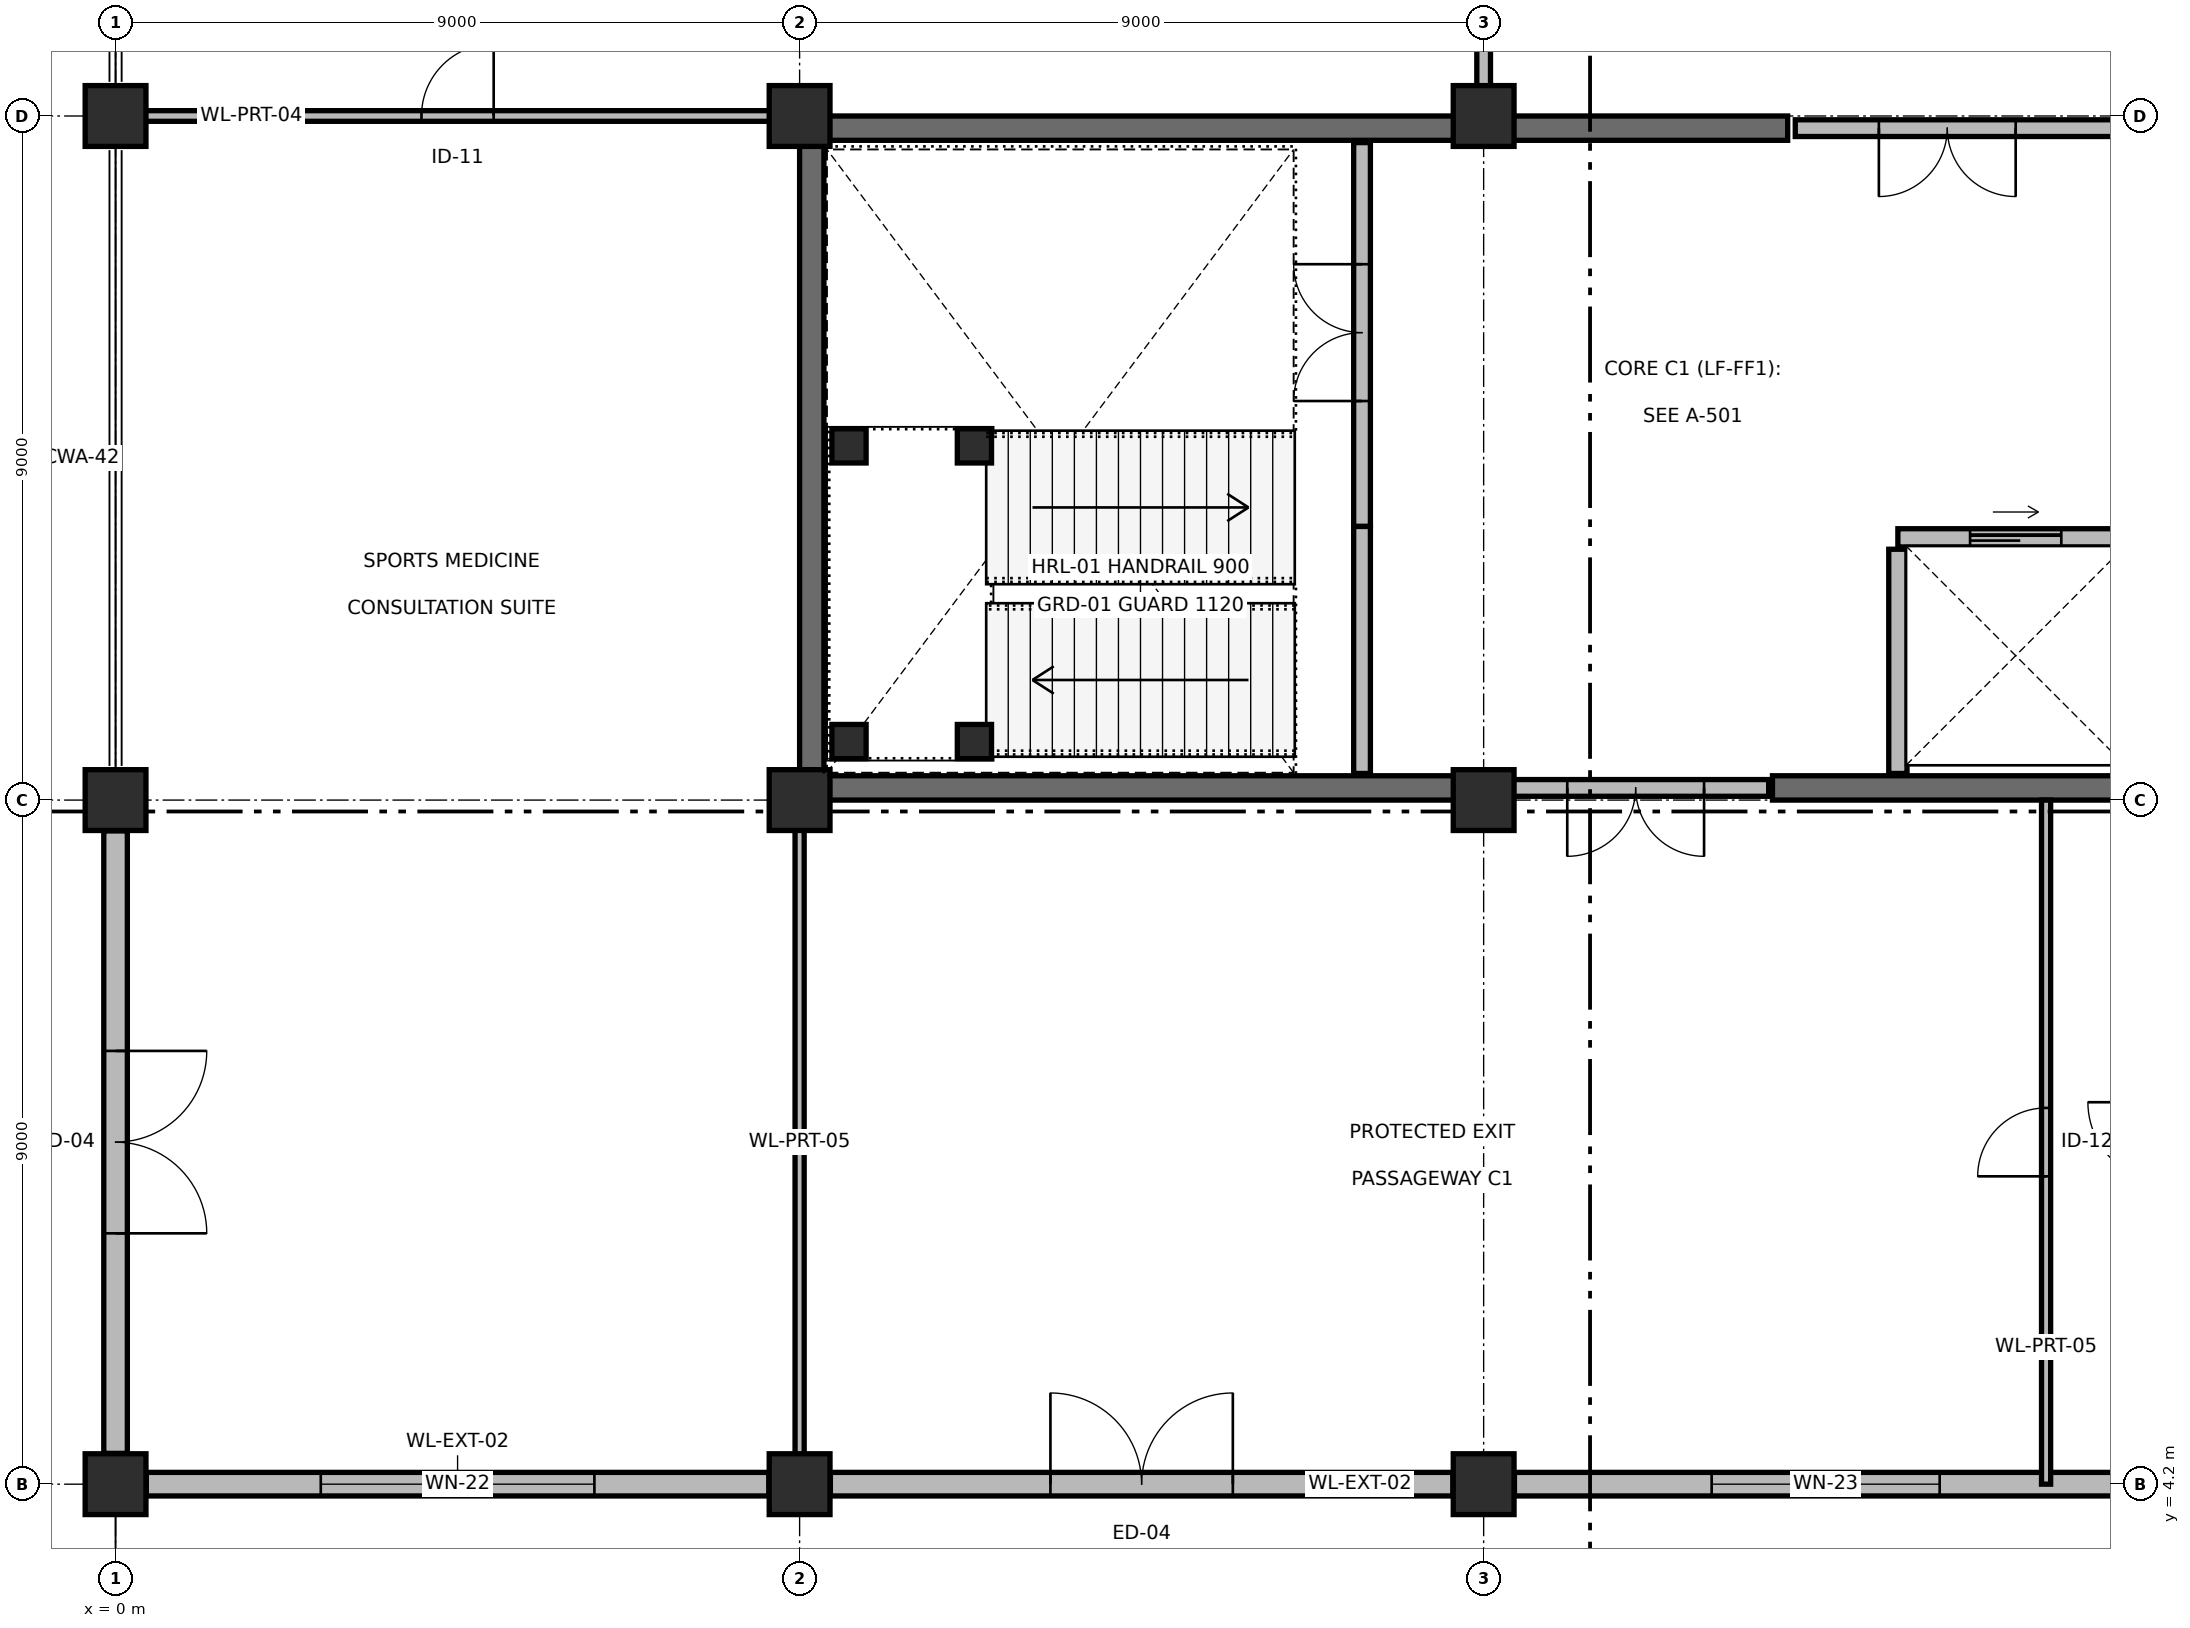
"""IFC4 building model, lengths in metres.
Left out: names, types, materials, properties, quantities, classifications, styles, units other than length and angle.
Written with IfcOpenShell. Run it as: python <this file> out.ifc"""

import sys

from ifc_helpers import new_model, si_unit, direction, frame, frame_2d, origin, origin_2d, place, context, subcontext, project, spatial, rectangle, extrude, element, fill, save


model = new_model("IFC4")
c1 = context("Model", 3, precision=1e-05, world=origin(), true_north=direction((0.0, 1.0)))
c2 = subcontext(c1, "Body", "Model", "MODEL_VIEW")
j1 = project(units=[si_unit("LENGTHUNIT", "METRE"), si_unit("PLANEANGLEUNIT", "RADIAN")], contexts=[c1])
p1 = place(None, origin())
s1 = spatial("IfcSite", under=j1, at=p1, CompositionType="ELEMENT")
p2 = place(p1, origin())
s2 = spatial("IfcBuilding", under=s1, at=p2, CompositionType="ELEMENT")
p3 = place(p2, origin())
s3 = spatial("IfcBuildingStorey", under=s2, at=p3, CompositionType="ELEMENT", Elevation=0.0)
for number, where, z_axis, x_axis in (
    (1, (0.0, 4.2, 0.0), (0.0, 0.0, 1.0), (1.0, 0.0, 0.0)),
    (2, (0.0, 13.2, 0.0), (0.0, 0.0, 1.0), (1.0, 0.0, 0.0)),
    (3, (0.0, 22.2, 0.0), (0.0, 0.0, 1.0), (1.0, 0.0, 0.0)),
    (4, (9.0, 4.2, 0.0), (0.0, 0.0, 1.0), (1.0, 0.0, 0.0)),
    (5, (9.0, 13.2, 0.0), (0.0, 0.0, 1.0), (1.0, 0.0, 0.0)),
    (6, (9.0, 22.2, 0.0), (0.0, 0.0, 1.0), (1.0, 0.0, 0.0)),
    (7, (18.0, 4.2, 0.0), (0.0, 0.0, 1.0), (1.0, 0.0, 0.0)),
    (8, (18.0, 13.2, 0.0), (0.0, 0.0, 1.0), (1.0, 0.0, 0.0)),
    (9, (18.0, 22.2, 0.0), (0.0, 0.0, 1.0), (1.0, 0.0, 0.0)),
):
    element("IfcColumn", number, at=place(p3, frame(where, z_axis=z_axis, x_axis=x_axis)), inside=s3, PredefinedType="COLUMN", context=c2, shape_type="SweptSolid", body=[
        extrude(rectangle(XDim=0.8, YDim=0.8, at=origin_2d()), origin(), (0.0, 0.0, 1.0), 4.8),
    ])
p4 = place(p3, frame((9.0, 13.36, 0.0), z_axis=(0.0, 0.0, 1.0), x_axis=(1.0, 0.0, 0.0)))
e10 = element("IfcWall", 10, at=p4, inside=s3, PredefinedType="SHEAR", context=c2, shape_type="SweptSolid", body=[
    extrude(rectangle(XDim=9.2, YDim=0.32, at=frame_2d((4.6, 0.0))), origin(), (0.0, 0.0, 1.0), 4.8),
])
p5 = place(p3, frame((21.8, 13.36, 0.0), z_axis=(0.0, 0.0, 1.0), x_axis=(1.0, 0.0, 0.0)))
e11 = element("IfcWall", 11, at=p5, inside=s3, PredefinedType="SHEAR", context=c2, shape_type="SweptSolid", body=[
    extrude(rectangle(XDim=5.2, YDim=0.32, at=frame_2d((2.6, 0.0))), origin(), (0.0, 0.0, 1.0), 4.8),
])
p6 = place(p3, frame((9.0, 22.04, 0.0), z_axis=(0.0, 0.0, 1.0), x_axis=(1.0, 0.0, 0.0)))
e12 = element("IfcWall", 12, at=p6, inside=s3, PredefinedType="SHEAR", context=c2, shape_type="SweptSolid", body=[
    extrude(rectangle(XDim=13.0, YDim=0.32, at=frame_2d((6.5, 0.0))), origin(), (0.0, 0.0, 1.0), 4.8),
])
p7 = place(p3, frame((9.16, 13.52, 0.0), z_axis=(0.0, 0.0, 1.0), x_axis=(0.0, 1.0, 0.0)))
e13 = element("IfcWall", 13, at=p7, inside=s3, PredefinedType="SHEAR", context=c2, shape_type="SweptSolid", body=[
    extrude(rectangle(XDim=8.36, YDim=0.32, at=frame_2d((4.18, 0.0))), origin(), (0.0, 0.0, 1.0), 4.8),
])
p8 = place(p3, frame((8.595, 4.2, 0.0), z_axis=(0.0, 0.0, 1.0), x_axis=(-1.0, 0.0, 0.0)))
e14 = element("IfcWall", 14, at=p8, inside=s3, PredefinedType="SOLIDWALL", context=c2, shape_type="SweptSolid", body=[
    extrude(rectangle(XDim=8.19, YDim=0.31, at=frame_2d((4.095, 0.0))), origin(), (0.0, 0.0, 1.0), 3.785),
])
p9 = place(p8, frame((2.295, 0.0, 0.85)))
e15 = element("IfcOpeningElement", 15, at=p9, cuts=e14, PredefinedType="OPENING", context=c2, shape_type="SweptSolid", body=[
    extrude(rectangle(XDim=3.6, YDim=2.0, at=frame_2d((1.8, 1.0))), frame((0.0, 0.165, 0.0), z_axis=(0.0, -1.0, 0.0), x_axis=(1.0, 0.0, 0.0)), (0.0, 0.0, 1.0), 0.33),
])
p10 = place(p3, frame((17.595, 4.2, 0.0), z_axis=(0.0, 0.0, 1.0), x_axis=(-1.0, 0.0, 0.0)))
e16 = element("IfcWall", 16, at=p10, inside=s3, PredefinedType="SOLIDWALL", context=c2, shape_type="SweptSolid", body=[
    extrude(rectangle(XDim=8.19, YDim=0.31, at=frame_2d((4.095, 0.0))), origin(), (0.0, 0.0, 1.0), 3.785),
])
p11 = place(p10, frame((2.895, 0.0, 0.0)))
e17 = element("IfcOpeningElement", 17, at=p11, cuts=e16, PredefinedType="OPENING", context=c2, shape_type="SweptSolid", body=[
    extrude(rectangle(XDim=2.4, YDim=2.4, at=frame_2d((1.2, 1.2))), frame((0.0, 0.165, 0.0), z_axis=(0.0, -1.0, 0.0), x_axis=(1.0, 0.0, 0.0)), (0.0, 0.0, 1.0), 0.33),
])
p12 = place(p3, frame((26.595, 4.2, 0.0), z_axis=(0.0, 0.0, 1.0), x_axis=(-1.0, 0.0, 0.0)))
e18 = element("IfcWall", 18, at=p12, inside=s3, PredefinedType="SOLIDWALL", context=c2, shape_type="SweptSolid", body=[
    extrude(rectangle(XDim=8.19, YDim=0.31, at=frame_2d((4.095, 0.0))), origin(), (0.0, 0.0, 1.0), 3.785),
])
p13 = place(p12, frame((2.595, 0.0, 0.85)))
e19 = element("IfcOpeningElement", 19, at=p13, cuts=e18, PredefinedType="OPENING", context=c2, shape_type="SweptSolid", body=[
    extrude(rectangle(XDim=3.0, YDim=2.0, at=frame_2d((1.5, 1.0))), frame((0.0, 0.165, 0.0), z_axis=(0.0, -1.0, 0.0), x_axis=(1.0, 0.0, 0.0)), (0.0, 0.0, 1.0), 0.33),
])
p14 = place(p3, frame((0.0, 4.605, 0.0), z_axis=(0.0, 0.0, 1.0), x_axis=(0.0, 1.0, 0.0)))
e20 = element("IfcWall", 20, at=p14, inside=s3, PredefinedType="SOLIDWALL", context=c2, shape_type="SweptSolid", body=[
    extrude(rectangle(XDim=8.19, YDim=0.31, at=frame_2d((4.095, 0.0))), origin(), (0.0, 0.0, 1.0), 3.785),
])
p15 = place(p14, frame((2.895, 0.0, 0.0)))
e21 = element("IfcOpeningElement", 21, at=p15, cuts=e20, PredefinedType="OPENING", context=c2, shape_type="SweptSolid", body=[
    extrude(rectangle(XDim=2.4, YDim=2.4, at=frame_2d((1.2, 1.2))), frame((0.0, 0.165, 0.0), z_axis=(0.0, -1.0, 0.0), x_axis=(1.0, 0.0, 0.0)), (0.0, 0.0, 1.0), 0.33),
])
p16 = place(p3, frame((16.4, 21.85, 0.0), z_axis=(0.0, 0.0, 1.0), x_axis=(0.0, -1.0, 0.0)))
e22 = element("IfcWall", 22, at=p16, inside=s3, PredefinedType="PARTITIONING", context=c2, shape_type="SweptSolid", body=[
    extrude(rectangle(XDim=5.05, YDim=0.22, at=frame_2d((2.525, 0.0))), origin(), (0.0, 0.0, 1.0), 3.835),
])
p17 = place(p16, frame((1.6, 0.0, 0.0)))
e23 = element("IfcOpeningElement", 23, at=p17, cuts=e22, PredefinedType="OPENING", context=c2, shape_type="SweptSolid", body=[
    extrude(rectangle(XDim=1.8, YDim=2.2, at=frame_2d((0.9, 1.1))), frame((0.0, 0.12, 0.0), z_axis=(0.0, -1.0, 0.0), x_axis=(1.0, 0.0, 0.0)), (0.0, 0.0, 1.0), 0.24),
])
p18 = place(p3, frame((16.4, 13.55, 0.0), z_axis=(0.0, 0.0, 1.0), x_axis=(0.0, 1.0, 0.0)))
e24 = element("IfcWall", 24, at=p18, inside=s3, PredefinedType="PARTITIONING", context=c2, shape_type="SweptSolid", body=[
    extrude(rectangle(XDim=3.25, YDim=0.22, at=frame_2d((1.625, 0.0))), origin(), (0.0, 0.0, 1.0), 3.835),
])
p19 = place(p3, frame((23.45, 16.65, 0.0), z_axis=(0.0, 0.0, 1.0), x_axis=(1.0, 0.0, 0.0)))
e25 = element("IfcWall", 25, at=p19, inside=s3, PredefinedType="SOLIDWALL", context=c2, shape_type="SweptSolid", body=[
    extrude(rectangle(XDim=3.1, YDim=0.24, at=frame_2d((1.55, 0.0))), origin(), (0.0, 0.0, 1.0), 4.505),
])
p20 = place(p19, frame((0.95, 0.0, 0.0)))
e26 = element("IfcOpeningElement", 26, at=p20, cuts=e25, PredefinedType="OPENING", context=c2, shape_type="SweptSolid", body=[
    extrude(rectangle(XDim=1.2, YDim=2.2, at=frame_2d((0.6, 1.1))), frame((0.0, 0.13, 0.0), z_axis=(0.0, -1.0, 0.0), x_axis=(1.0, 0.0, 0.0)), (0.0, 0.0, 1.0), 0.26),
])
p21 = place(p3, frame((23.45, 13.55, 0.0), z_axis=(0.0, 0.0, 1.0), x_axis=(0.0, 1.0, 0.0)))
e27 = element("IfcWall", 27, at=p21, inside=s3, PredefinedType="SOLIDWALL", context=c2, shape_type="SweptSolid", body=[
    extrude(rectangle(XDim=2.95, YDim=0.24, at=frame_2d((1.475, 0.0))), origin(), (0.0, 0.0, 1.0), 3.835),
])
p22 = place(p3, frame((22.1, 22.04, 0.0), z_axis=(0.0, 0.0, 1.0), x_axis=(1.0, 0.0, 0.0)))
e28 = element("IfcWall", 28, at=p22, inside=s3, PredefinedType="PARTITIONING", context=c2, shape_type="SweptSolid", body=[
    extrude(rectangle(XDim=4.5, YDim=0.22, at=frame_2d((2.25, 0.0))), origin(), (0.0, 0.0, 1.0), 3.835),
])
p23 = place(p22, frame((1.1, 0.0, 0.0)))
e29 = element("IfcOpeningElement", 29, at=p23, cuts=e28, PredefinedType="OPENING", context=c2, shape_type="SweptSolid", body=[
    extrude(rectangle(XDim=1.8, YDim=2.2, at=frame_2d((0.9, 1.1))), frame((0.0, 0.12, 0.0), z_axis=(0.0, -1.0, 0.0), x_axis=(1.0, 0.0, 0.0)), (0.0, 0.0, 1.0), 0.24),
])
p24 = place(p3, frame((18.25, 13.36, 0.0), z_axis=(0.0, 0.0, 1.0), x_axis=(1.0, 0.0, 0.0)))
e30 = element("IfcWall", 30, at=p24, inside=s3, PredefinedType="PARTITIONING", context=c2, shape_type="SweptSolid", body=[
    extrude(rectangle(XDim=3.5, YDim=0.22, at=frame_2d((1.75, 0.0))), origin(), (0.0, 0.0, 1.0), 3.835),
])
p25 = place(p24, frame((0.85, 0.0, 0.0)))
e31 = element("IfcOpeningElement", 31, at=p25, cuts=e30, PredefinedType="OPENING", context=c2, shape_type="SweptSolid", body=[
    extrude(rectangle(XDim=1.8, YDim=2.2, at=frame_2d((0.9, 1.1))), frame((0.0, 0.12, 0.0), z_axis=(0.0, -1.0, 0.0), x_axis=(1.0, 0.0, 0.0)), (0.0, 0.0, 1.0), 0.24),
])
p26 = place(p3, frame((0.0, 22.2, 0.0), z_axis=(0.0, 0.0, 1.0), x_axis=(1.0, 0.0, 0.0)))
e32 = element("IfcWall", 32, at=p26, inside=s3, PredefinedType="PARTITIONING", context=c2, shape_type="SweptSolid", body=[
    extrude(rectangle(XDim=9.0, YDim=0.14, at=frame_2d((4.5, 0.0))), origin(), (0.0, 0.0, 1.0), 3.835),
])
p27 = place(p26, frame((4.025, 0.0, 0.0)))
e33 = element("IfcOpeningElement", 33, at=p27, cuts=e32, PredefinedType="OPENING", context=c2, shape_type="SweptSolid", body=[
    extrude(rectangle(XDim=0.95, YDim=2.1, at=frame_2d((0.475, 1.05))), frame((0.0, 0.08, 0.0), z_axis=(0.0, -1.0, 0.0), x_axis=(1.0, 0.0, 0.0)), (0.0, 0.0, 1.0), 0.16),
])
p28 = place(p3, frame((25.4, 4.2, 0.0), z_axis=(0.0, 0.0, 1.0), x_axis=(0.0, 1.0, 0.0)))
e34 = element("IfcWall", 34, at=p28, inside=s3, PredefinedType="PARTITIONING", context=c2, shape_type="SweptSolid", body=[
    extrude(rectangle(XDim=9.0, YDim=0.12, at=frame_2d((4.5, 0.0))), origin(), (0.0, 0.0, 1.0), 3.785),
])
p29 = place(p28, frame((4.05, 0.0, 0.0)))
e35 = element("IfcOpeningElement", 35, at=p29, cuts=e34, PredefinedType="OPENING", context=c2, shape_type="SweptSolid", body=[
    extrude(rectangle(XDim=0.9, YDim=2.1, at=frame_2d((0.45, 1.05))), frame((0.0, 0.07, 0.0), z_axis=(0.0, -1.0, 0.0), x_axis=(1.0, 0.0, 0.0)), (0.0, 0.0, 1.0), 0.14),
])
p30 = place(p3, frame((9.0, 4.2, 0.0), z_axis=(0.0, 0.0, 1.0), x_axis=(0.0, 1.0, 0.0)))
e36 = element("IfcWall", 36, at=p30, inside=s3, PredefinedType="PARTITIONING", context=c2, shape_type="SweptSolid", body=[
    extrude(rectangle(XDim=9.0, YDim=0.12, at=frame_2d((4.5, 0.0))), origin(), (0.0, 0.0, 1.0), 3.835),
])
p31 = place(p3, frame((18.0, 22.2, 0.0), z_axis=(0.0, 0.0, 1.0), x_axis=(0.0, 1.0, 0.0)))
e37 = element("IfcWall", 37, at=p31, inside=s3, PredefinedType="PARTITIONING", context=c2, shape_type="SweptSolid", body=[
    extrude(rectangle(XDim=18.6, YDim=0.18, at=frame_2d((9.3, 0.0))), origin(), (0.0, 0.0, 1.0), 2.18),
])
for number, where, z_axis, x_axis in (
    (38, (9.65, 13.97, 0.0), (0.0, 0.0, 1.0), (1.0, 0.0, 0.0)),
    (39, (11.3, 13.97, 0.0), (0.0, 0.0, 1.0), (1.0, 0.0, 0.0)),
    (40, (9.65, 17.86, 0.0), (0.0, 0.0, 1.0), (1.0, 0.0, 0.0)),
    (41, (11.3, 17.86, 0.0), (0.0, 0.0, 1.0), (1.0, 0.0, 0.0)),
):
    element("IfcColumn", number, at=place(p3, frame(where, z_axis=z_axis, x_axis=x_axis)), inside=s3, PredefinedType="COLUMN", context=c2, shape_type="SweptSolid", body=[
        extrude(rectangle(XDim=0.45, YDim=0.45, at=origin_2d()), origin(), (0.0, 0.0, 1.0), 4.8),
    ])
p32 = place(p9, origin())
e42 = element("IfcWindow", 42, at=p32, inside=s3, PartitioningType="SINGLE_PANEL", PredefinedType="WINDOW", context=c2, shape_type="SweptSolid", body=[
    extrude(rectangle(XDim=3.6, YDim=2.0, at=frame_2d((1.8, 1.0))), frame((0.0, 0.03, 0.0), z_axis=(0.0, -1.0, 0.0), x_axis=(1.0, 0.0, 0.0)), (0.0, 0.0, 1.0), 0.06),
])
fill(e15, e42)
p33 = place(p11, origin())
e43 = element("IfcDoor", 43, at=p33, inside=s3, OperationType="DOUBLE_DOOR_SINGLE_SWING", PredefinedType="DOOR", context=c2, shape_type="SweptSolid", body=[
    extrude(rectangle(XDim=2.4, YDim=2.4, at=frame_2d((1.2, 1.2))), frame((0.0, 0.025, 0.0), z_axis=(0.0, -1.0, 0.0), x_axis=(1.0, 0.0, 0.0)), (0.0, 0.0, 1.0), 0.05),
])
fill(e17, e43)
p34 = place(p13, origin())
e44 = element("IfcWindow", 44, at=p34, inside=s3, PartitioningType="SINGLE_PANEL", PredefinedType="WINDOW", context=c2, shape_type="SweptSolid", body=[
    extrude(rectangle(XDim=3.0, YDim=2.0, at=frame_2d((1.5, 1.0))), frame((0.0, 0.03, 0.0), z_axis=(0.0, -1.0, 0.0), x_axis=(1.0, 0.0, 0.0)), (0.0, 0.0, 1.0), 0.06),
])
fill(e19, e44)
p35 = place(p15, origin())
e45 = element("IfcDoor", 45, at=p35, inside=s3, OperationType="DOUBLE_DOOR_SINGLE_SWING", PredefinedType="DOOR", context=c2, shape_type="SweptSolid", body=[
    extrude(rectangle(XDim=2.4, YDim=2.4, at=frame_2d((1.2, 1.2))), frame((0.0, 0.025, 0.0), z_axis=(0.0, -1.0, 0.0), x_axis=(1.0, 0.0, 0.0)), (0.0, 0.0, 1.0), 0.05),
])
fill(e21, e45)
p36 = place(p17, origin())
e46 = element("IfcDoor", 46, at=p36, inside=s3, OperationType="DOUBLE_DOOR_SINGLE_SWING", PredefinedType="DOOR", context=c2, shape_type="SweptSolid", body=[
    extrude(rectangle(XDim=1.8, YDim=2.2, at=frame_2d((0.9, 1.1))), frame((0.0, 0.025, 0.0), z_axis=(0.0, -1.0, 0.0), x_axis=(1.0, 0.0, 0.0)), (0.0, 0.0, 1.0), 0.05),
])
fill(e23, e46)
p37 = place(p20, origin())
e47 = element("IfcDoor", 47, at=p37, inside=s3, OperationType="DOUBLE_DOOR_SLIDING", PredefinedType="DOOR", context=c2, shape_type="SweptSolid", body=[
    extrude(rectangle(XDim=1.2, YDim=2.2, at=frame_2d((0.6, 1.1))), frame((0.0, 0.025, 0.0), z_axis=(0.0, -1.0, 0.0), x_axis=(1.0, 0.0, 0.0)), (0.0, 0.0, 1.0), 0.05),
])
fill(e26, e47)
p38 = place(p23, origin())
e48 = element("IfcDoor", 48, at=p38, inside=s3, OperationType="DOUBLE_DOOR_SINGLE_SWING", PredefinedType="DOOR", context=c2, shape_type="SweptSolid", body=[
    extrude(rectangle(XDim=1.8, YDim=2.2, at=frame_2d((0.9, 1.1))), frame((0.0, 0.025, 0.0), z_axis=(0.0, -1.0, 0.0), x_axis=(1.0, 0.0, 0.0)), (0.0, 0.0, 1.0), 0.05),
])
fill(e29, e48)
p39 = place(p25, origin())
e49 = element("IfcDoor", 49, at=p39, inside=s3, OperationType="DOUBLE_DOOR_SINGLE_SWING", PredefinedType="DOOR", context=c2, shape_type="SweptSolid", body=[
    extrude(rectangle(XDim=1.8, YDim=2.2, at=frame_2d((0.9, 1.1))), frame((0.0, 0.025, 0.0), z_axis=(0.0, -1.0, 0.0), x_axis=(1.0, 0.0, 0.0)), (0.0, 0.0, 1.0), 0.05),
])
fill(e31, e49)
p40 = place(p27, origin())
e50 = element("IfcDoor", 50, at=p40, inside=s3, OperationType="SINGLE_SWING_RIGHT", PredefinedType="DOOR", context=c2, shape_type="SweptSolid", body=[
    extrude(rectangle(XDim=0.95, YDim=2.1, at=frame_2d((0.475, 1.05))), frame((0.0, 0.025, 0.0), z_axis=(0.0, -1.0, 0.0), x_axis=(1.0, 0.0, 0.0)), (0.0, 0.0, 1.0), 0.05),
])
fill(e33, e50)
p41 = place(p29, origin())
e51 = element("IfcDoor", 51, at=p41, inside=s3, OperationType="SINGLE_SWING_LEFT", PredefinedType="DOOR", context=c2, shape_type="SweptSolid", body=[
    extrude(rectangle(XDim=0.9, YDim=2.1, at=frame_2d((0.45, 1.05))), frame((0.0, 0.025, 0.0), z_axis=(0.0, -1.0, 0.0), x_axis=(1.0, 0.0, 0.0)), (0.0, 0.0, 1.0), 0.05),
])
fill(e35, e51)
save(model, sys.argv[1])
